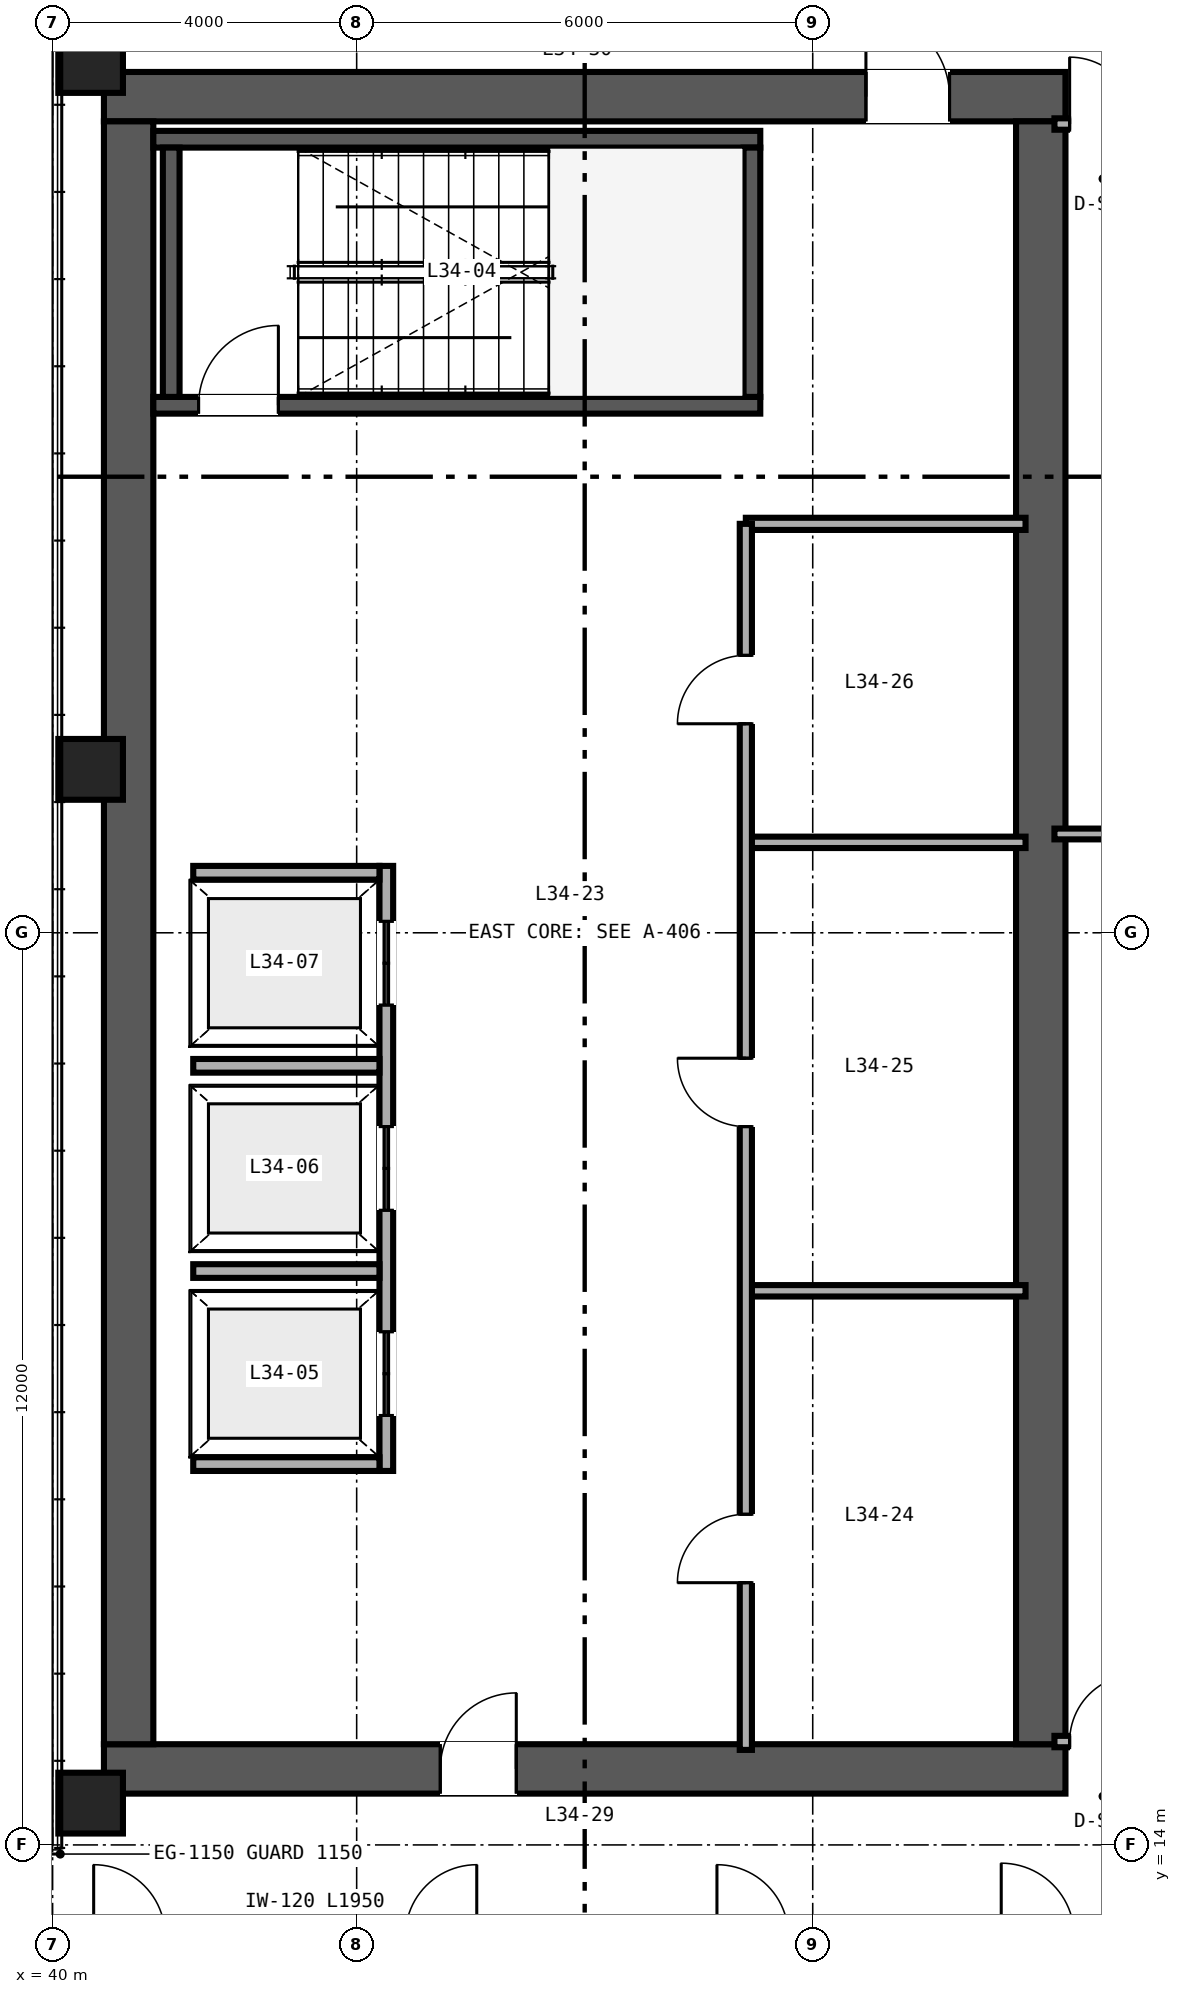
"""IFC4 building model, lengths in metres.
Left out: names, types, materials, properties, quantities, classifications, styles, units other than length and angle.
Written with IfcOpenShell. Run it as: python <this file> out.ifc"""

import sys

from ifc_helpers import new_model, si_unit, direction, frame, frame_2d, origin, origin_2d, place, context, subcontext, project, spatial, rectangle, hollow_rectangle, extrude, source, transform, mapped, element, fill, save


model = new_model("IFC4")
c1 = context("Model", 3, precision=1e-05, world=origin(), true_north=direction((0.0, 1.0)))
c2 = subcontext(c1, "Body", "Model", "MODEL_VIEW")
j1 = project(units=[si_unit("LENGTHUNIT", "METRE"), si_unit("PLANEANGLEUNIT", "RADIAN")], contexts=[c1])
p1 = place(None, origin())
s1 = spatial("IfcSite", under=j1, at=p1, CompositionType="ELEMENT")
p2 = place(p1, origin())
s2 = spatial("IfcBuilding", under=s1, at=p2, CompositionType="ELEMENT")
p3 = place(p2, frame((0.0, 0.0, 136.8)))
s3 = spatial("IfcBuildingStorey", under=s2, at=p3, CompositionType="ELEMENT", Elevation=136.8)
p4 = place(p3, frame((40.675, 15.0, 0.0), z_axis=(0.0, 0.0, 1.0), x_axis=(1.0, 0.0, 0.0)))
e1 = element("IfcWall", 1, at=p4, inside=s3, PredefinedType="SHEAR", context=c2, shape_type="SweptSolid", body=[
    extrude(rectangle(XDim=12.65, YDim=0.65, at=frame_2d((6.325, 0.0))), origin(), (0.0, 0.0, 1.0), 3.36),
])
p5 = place(p4, frame((4.425, 0.0, 0.0)))
e2 = element("IfcOpeningElement", 2, at=p5, cuts=e1, PredefinedType="OPENING", context=c2, shape_type="SweptSolid", body=[
    extrude(rectangle(XDim=1.0, YDim=2.15, at=frame_2d((0.5, 1.075))), frame((0.0, 0.335, 0.0), z_axis=(0.0, -1.0, 0.0), x_axis=(1.0, 0.0, 0.0)), (0.0, 0.0, 1.0), 0.67),
])
p6 = place(p3, frame((40.675, 37.0, 0.0), z_axis=(0.0, 0.0, 1.0), x_axis=(1.0, 0.0, 0.0)))
e3 = element("IfcWall", 3, at=p6, inside=s3, PredefinedType="SHEAR", context=c2, shape_type="SweptSolid", body=[
    extrude(rectangle(XDim=12.65, YDim=0.65, at=frame_2d((6.325, 0.0))), origin(), (0.0, 0.0, 1.0), 3.36),
])
p7 = place(p6, frame((10.025, 0.0, 0.0)))
e4 = element("IfcOpeningElement", 4, at=p7, cuts=e3, PredefinedType="OPENING", context=c2, shape_type="SweptSolid", body=[
    extrude(rectangle(XDim=1.1, YDim=2.15, at=frame_2d((0.55, 1.075))), frame((0.0, 0.335, 0.0), z_axis=(0.0, -1.0, 0.0), x_axis=(1.0, 0.0, 0.0)), (0.0, 0.0, 1.0), 0.67),
])
for number, where, z_axis, x_axis in (
    (5, (41.0, 15.325, 0.0), (0.0, 0.0, 1.0), (0.0, 1.0, 0.0)),
    (6, (53.0, 15.325, 0.0), (0.0, 0.0, 1.0), (0.0, 1.0, 0.0)),
):
    element("IfcWall", number, at=place(p3, frame(where, z_axis=z_axis, x_axis=x_axis)), inside=s3, PredefinedType="SHEAR", context=c2, shape_type="SweptSolid", body=[
        extrude(rectangle(XDim=21.35, YDim=0.65, at=frame_2d((10.675, 0.0))), origin(), (0.0, 0.0, 1.0), 3.36),
    ])
p8 = place(p3, frame((41.325, 32.94, 0.0), z_axis=(0.0, 0.0, 1.0), x_axis=(1.0, 0.0, 0.0)))
e7 = element("IfcWall", 7, at=p8, inside=s3, PredefinedType="SHEAR", context=c2, shape_type="SweptSolid", body=[
    extrude(rectangle(XDim=7.985, YDim=0.22, at=frame_2d((3.993, 0.0))), origin(), (0.0, 0.0, 1.0), 3.4),
])
p9 = place(p8, frame((0.595, 0.0, 0.0)))
e8 = element("IfcOpeningElement", 8, at=p9, cuts=e7, PredefinedType="OPENING", context=c2, shape_type="SweptSolid", body=[
    extrude(rectangle(XDim=1.05, YDim=2.15, at=frame_2d((0.525, 1.075))), frame((0.0, 0.12, 0.0), z_axis=(0.0, -1.0, 0.0), x_axis=(1.0, 0.0, 0.0)), (0.0, 0.0, 1.0), 0.24),
])
p10 = place(p3, frame((41.325, 36.44, 0.0), z_axis=(0.0, 0.0, 1.0), x_axis=(1.0, 0.0, 0.0)))
e9 = element("IfcWall", 9, at=p10, inside=s3, PredefinedType="SHEAR", context=c2, shape_type="SweptSolid", body=[
    extrude(rectangle(XDim=7.985, YDim=0.22, at=frame_2d((3.993, 0.0))), origin(), (0.0, 0.0, 1.0), 3.4),
])
for number, where, z_axis, x_axis in (
    (10, (41.56, 33.05, 0.0), (0.0, 0.0, 1.0), (0.0, 1.0, 0.0)),
    (11, (49.2, 33.05, 0.0), (0.0, 0.0, 1.0), (0.0, 1.0, 0.0)),
):
    element("IfcWall", number, at=place(p3, frame(where, z_axis=z_axis, x_axis=x_axis)), inside=s3, PredefinedType="SHEAR", context=c2, shape_type="SweptSolid", body=[
        extrude(rectangle(XDim=3.28, YDim=0.22, at=frame_2d((1.64, 0.0))), origin(), (0.0, 0.0, 1.0), 3.4),
    ])
m1 = source(origin(), c2, "Body", "SweptSolid", [
    extrude(hollow_rectangle(XDim=0.85, YDim=0.8, WallThickness=0.032, at=origin_2d()), origin(), (0.0, 0.0, 1.0), 3.36),
])
for number, where, z_axis, x_axis in (
    (12, (40.5, 14.55, 0.0), (0.0, 0.0, 1.0), (1.0, 0.0, 0.0)),
    (13, (40.5, 28.15, 0.0), (0.0, 0.0, 1.0), (1.0, 0.0, 0.0)),
    (14, (40.5, 37.45, 0.0), (0.0, 0.0, 1.0), (1.0, 0.0, 0.0)),
):
    element("IfcColumn", number, at=place(p3, frame(where, z_axis=z_axis, x_axis=x_axis)), inside=s3, PredefinedType="COLUMN", context=c2, shape_type="MappedRepresentation", body=[
        mapped(m1, transform((0.0, 0.0, 0.0), scale=1.0)),
    ])
p11 = place(p3, frame((44.39, 18.92, 0.0), z_axis=(0.0, 0.0, 1.0), x_axis=(0.0, 1.0, 0.0)))
e15 = element("IfcWall", 15, at=p11, inside=s3, PredefinedType="SOLIDWALL", context=c2, shape_type="SweptSolid", body=[
    extrude(rectangle(XDim=7.96, YDim=0.18, at=frame_2d((3.98, 0.0))), origin(), (0.0, 0.0, 1.0), 3.36),
])
p12 = place(p11, frame((0.73, 0.0, 0.0)))
e16 = element("IfcOpeningElement", 16, at=p12, cuts=e15, PredefinedType="OPENING", context=c2, shape_type="SweptSolid", body=[
    extrude(rectangle(XDim=1.1, YDim=2.2, at=frame_2d((0.55, 1.1))), frame((0.0, 0.1, 0.0), z_axis=(0.0, -1.0, 0.0), x_axis=(1.0, 0.0, 0.0)), (0.0, 0.0, 1.0), 0.2),
])
p13 = place(p11, frame((3.43, 0.0, 0.0)))
e17 = element("IfcOpeningElement", 17, at=p13, cuts=e15, PredefinedType="OPENING", context=c2, shape_type="SweptSolid", body=[
    extrude(rectangle(XDim=1.1, YDim=2.2, at=frame_2d((0.55, 1.1))), frame((0.0, 0.1, 0.0), z_axis=(0.0, -1.0, 0.0), x_axis=(1.0, 0.0, 0.0)), (0.0, 0.0, 1.0), 0.2),
])
p14 = place(p11, frame((6.13, 0.0, 0.0)))
e18 = element("IfcOpeningElement", 18, at=p14, cuts=e15, PredefinedType="OPENING", context=c2, shape_type="SweptSolid", body=[
    extrude(rectangle(XDim=1.1, YDim=2.2, at=frame_2d((0.55, 1.1))), frame((0.0, 0.1, 0.0), z_axis=(0.0, -1.0, 0.0), x_axis=(1.0, 0.0, 0.0)), (0.0, 0.0, 1.0), 0.2),
])
for number, where, z_axis, x_axis in (
    (19, (41.85, 19.01, 0.0), (0.0, 0.0, 1.0), (1.0, 0.0, 0.0)),
    (20, (41.85, 26.79, 0.0), (0.0, 0.0, 1.0), (1.0, 0.0, 0.0)),
    (21, (41.85, 21.55, 0.0), (0.0, 0.0, 1.0), (1.0, 0.0, 0.0)),
    (22, (41.85, 24.25, 0.0), (0.0, 0.0, 1.0), (1.0, 0.0, 0.0)),
):
    element("IfcWall", number, at=place(p3, frame(where, z_axis=z_axis, x_axis=x_axis)), inside=s3, PredefinedType="SOLIDWALL", context=c2, shape_type="SweptSolid", body=[
        extrude(rectangle(XDim=2.45, YDim=0.18, at=frame_2d((1.225, 0.0))), origin(), (0.0, 0.0, 1.0), 3.36),
    ])
p15 = place(p3, frame((49.12, 31.38, 0.0), z_axis=(0.0, 0.0, 1.0), x_axis=(1.0, 0.0, 0.0)))
e23 = element("IfcWall", 23, at=p15, inside=s3, PredefinedType="PARTITIONING", context=c2, shape_type="SweptSolid", body=[
    extrude(rectangle(XDim=3.68, YDim=0.16, at=frame_2d((1.84, 0.0))), origin(), (0.0, 0.0, 1.0), 2.36),
])
for number, where, z_axis, x_axis in (
    (24, (49.12, 21.29, 0.0), (0.0, 0.0, 1.0), (1.0, 0.0, 0.0)),
    (25, (49.12, 27.19, 0.0), (0.0, 0.0, 1.0), (1.0, 0.0, 0.0)),
):
    element("IfcWall", number, at=place(p3, frame(where, z_axis=z_axis, x_axis=x_axis)), inside=s3, PredefinedType="PARTITIONING", context=c2, shape_type="SweptSolid", body=[
        extrude(rectangle(XDim=3.68, YDim=0.15, at=frame_2d((1.84, 0.0))), origin(), (0.0, 0.0, 1.0), 3.36),
    ])
p16 = place(p3, frame((49.12, 15.25, 0.0), z_axis=(0.0, 0.0, 1.0), x_axis=(0.0, 1.0, 0.0)))
e26 = element("IfcWall", 26, at=p16, inside=s3, PredefinedType="PARTITIONING", context=c2, shape_type="SweptSolid", body=[
    extrude(rectangle(XDim=16.13, YDim=0.16, at=frame_2d((8.065, 0.0))), origin(), (0.0, 0.0, 1.0), 2.36),
])
p17 = place(p16, frame((2.2, 0.0, 0.0)))
e27 = element("IfcOpeningElement", 27, at=p17, cuts=e26, PredefinedType="OPENING", context=c2, shape_type="SweptSolid", body=[
    extrude(rectangle(XDim=0.9, YDim=2.15, at=frame_2d((0.45, 1.075))), frame((0.0, 0.09, 0.0), z_axis=(0.0, -1.0, 0.0), x_axis=(1.0, 0.0, 0.0)), (0.0, 0.0, 1.0), 0.18),
])
p18 = place(p16, frame((8.2, 0.0, 0.0)))
e28 = element("IfcOpeningElement", 28, at=p18, cuts=e26, PredefinedType="OPENING", context=c2, shape_type="SweptSolid", body=[
    extrude(rectangle(XDim=0.9, YDim=2.15, at=frame_2d((0.45, 1.075))), frame((0.0, 0.09, 0.0), z_axis=(0.0, -1.0, 0.0), x_axis=(1.0, 0.0, 0.0)), (0.0, 0.0, 1.0), 0.18),
])
p19 = place(p16, frame((13.5, 0.0, 0.0)))
e29 = element("IfcOpeningElement", 29, at=p19, cuts=e26, PredefinedType="OPENING", context=c2, shape_type="SweptSolid", body=[
    extrude(rectangle(XDim=0.9, YDim=2.15, at=frame_2d((0.45, 1.075))), frame((0.0, 0.09, 0.0), z_axis=(0.0, -1.0, 0.0), x_axis=(1.0, 0.0, 0.0)), (0.0, 0.0, 1.0), 0.18),
])
p20 = place(p3, frame((53.18, 15.36, 0.0), z_axis=(0.0, 0.0, 1.0), x_axis=(1.0, 0.0, 0.0)))
e30 = element("IfcWall", 30, at=p20, inside=s3, PredefinedType="PARTITIONING", context=c2, shape_type="SweptSolid", body=[
    extrude(rectangle(XDim=2.66, YDim=0.15, at=frame_2d((1.33, 0.0))), origin(), (0.0, 0.0, 1.0), 2.581),
])
p21 = place(p20, frame((0.2, 0.0, 0.0)))
e31 = element("IfcOpeningElement", 31, at=p21, cuts=e30, PredefinedType="OPENING", context=c2, shape_type="SweptSolid", body=[
    extrude(rectangle(XDim=0.88, YDim=2.15, at=frame_2d((0.44, 1.075))), frame((0.0, 0.085, 0.0), z_axis=(0.0, -1.0, 0.0), x_axis=(1.0, 0.0, 0.0)), (0.0, 0.0, 1.0), 0.17),
])
p22 = place(p3, frame((53.18, 36.64, 0.0), z_axis=(0.0, 0.0, 1.0), x_axis=(1.0, 0.0, 0.0)))
e32 = element("IfcWall", 32, at=p22, inside=s3, PredefinedType="PARTITIONING", context=c2, shape_type="SweptSolid", body=[
    extrude(rectangle(XDim=2.66, YDim=0.15, at=frame_2d((1.33, 0.0))), origin(), (0.0, 0.0, 1.0), 2.743),
])
p23 = place(p22, frame((0.2, 0.0, 0.0)))
e33 = element("IfcOpeningElement", 33, at=p23, cuts=e32, PredefinedType="OPENING", context=c2, shape_type="SweptSolid", body=[
    extrude(rectangle(XDim=0.88, YDim=2.15, at=frame_2d((0.44, 1.075))), frame((0.0, 0.085, 0.0), z_axis=(0.0, -1.0, 0.0), x_axis=(1.0, 0.0, 0.0)), (0.0, 0.0, 1.0), 0.17),
])
p24 = place(p3, frame((53.18, 27.3, 0.0), z_axis=(0.0, 0.0, 1.0), x_axis=(1.0, 0.0, 0.0)))
e34 = element("IfcWall", 34, at=p24, inside=s3, PredefinedType="PARTITIONING", context=c2, shape_type="SweptSolid", body=[
    extrude(rectangle(XDim=2.66, YDim=0.142, at=frame_2d((1.33, 0.0))), origin(), (0.0, 0.0, 1.0), 2.581),
])
m2 = source(origin(), c2, "Body", "SweptSolid", [
    extrude(rectangle(XDim=1.05, YDim=2.15, at=frame_2d((0.525, 1.075))), frame((0.0, 0.025, 0.0), z_axis=(0.0, -1.0, 0.0), x_axis=(1.0, 0.0, 0.0)), (0.0, 0.0, 1.0), 0.05),
])
p25 = place(p9, origin())
e35 = element("IfcDoor", 35, at=p25, inside=s3, OperationType="SINGLE_SWING_RIGHT", PredefinedType="DOOR", context=c2, shape_type="MappedRepresentation", body=[
    mapped(m2, transform((0.0, 0.0, 0.0), scale=1.0)),
])
fill(e8, e35)
m3 = source(origin(), c2, "Body", "SweptSolid", [
    extrude(rectangle(XDim=1.1, YDim=2.2, at=frame_2d((0.55, 1.1))), frame((0.0, 0.025, 0.0), z_axis=(0.0, -1.0, 0.0), x_axis=(1.0, 0.0, 0.0)), (0.0, 0.0, 1.0), 0.05),
])
p26 = place(p12, origin())
e36 = element("IfcDoor", 36, at=p26, inside=s3, OperationType="DOUBLE_DOOR_SLIDING", PredefinedType="DOOR", context=c2, shape_type="MappedRepresentation", body=[
    mapped(m3, transform((0.0, 0.0, 0.0), scale=1.0)),
])
fill(e16, e36)
p27 = place(p13, origin())
e37 = element("IfcDoor", 37, at=p27, inside=s3, OperationType="DOUBLE_DOOR_SLIDING", PredefinedType="DOOR", context=c2, shape_type="MappedRepresentation", body=[
    mapped(m3, transform((0.0, 0.0, 0.0), scale=1.0)),
])
fill(e17, e37)
p28 = place(p14, origin())
e38 = element("IfcDoor", 38, at=p28, inside=s3, OperationType="DOUBLE_DOOR_SLIDING", PredefinedType="DOOR", context=c2, shape_type="MappedRepresentation", body=[
    mapped(m3, transform((0.0, 0.0, 0.0), scale=1.0)),
])
fill(e18, e38)
m4 = source(origin(), c2, "Body", "SweptSolid", [
    extrude(rectangle(XDim=1.0, YDim=2.15, at=frame_2d((0.5, 1.075))), frame((0.0, 0.025, 0.0), z_axis=(0.0, -1.0, 0.0), x_axis=(1.0, 0.0, 0.0)), (0.0, 0.0, 1.0), 0.05),
])
p29 = place(p5, origin())
e39 = element("IfcDoor", 39, at=p29, inside=s3, OperationType="SINGLE_SWING_RIGHT", PredefinedType="DOOR", context=c2, shape_type="MappedRepresentation", body=[
    mapped(m4, transform((0.0, 0.0, 0.0), scale=1.0)),
])
fill(e2, e39)
m5 = source(origin(), c2, "Body", "SweptSolid", [
    extrude(rectangle(XDim=1.1, YDim=2.15, at=frame_2d((0.55, 1.075))), frame((0.0, 0.025, 0.0), z_axis=(0.0, -1.0, 0.0), x_axis=(1.0, 0.0, 0.0)), (0.0, 0.0, 1.0), 0.05),
])
p30 = place(p7, origin())
e40 = element("IfcDoor", 40, at=p30, inside=s3, OperationType="SINGLE_SWING_LEFT", PredefinedType="DOOR", context=c2, shape_type="MappedRepresentation", body=[
    mapped(m5, transform((0.0, 0.0, 0.0), scale=1.0)),
])
fill(e4, e40)
m6 = source(origin(), c2, "Body", "SweptSolid", [
    extrude(rectangle(XDim=0.9, YDim=2.15, at=frame_2d((0.45, 1.075))), frame((0.0, 0.025, 0.0), z_axis=(0.0, -1.0, 0.0), x_axis=(1.0, 0.0, 0.0)), (0.0, 0.0, 1.0), 0.05),
])
p31 = place(p17, origin())
e41 = element("IfcDoor", 41, at=p31, inside=s3, OperationType="SINGLE_SWING_LEFT", PredefinedType="DOOR", context=c2, shape_type="MappedRepresentation", body=[
    mapped(m6, transform((0.0, 0.0, 0.0), scale=1.0)),
])
fill(e27, e41)
p32 = place(p18, origin())
e42 = element("IfcDoor", 42, at=p32, inside=s3, OperationType="SINGLE_SWING_RIGHT", PredefinedType="DOOR", context=c2, shape_type="MappedRepresentation", body=[
    mapped(m6, transform((0.0, 0.0, 0.0), scale=1.0)),
])
fill(e28, e42)
p33 = place(p19, origin())
e43 = element("IfcDoor", 43, at=p33, inside=s3, OperationType="SINGLE_SWING_LEFT", PredefinedType="DOOR", context=c2, shape_type="MappedRepresentation", body=[
    mapped(m6, transform((0.0, 0.0, 0.0), scale=1.0)),
])
fill(e29, e43)
m7 = source(origin(), c2, "Body", "SweptSolid", [
    extrude(rectangle(XDim=0.88, YDim=2.15, at=frame_2d((0.44, 1.075))), frame((0.0, 0.025, 0.0), z_axis=(0.0, -1.0, 0.0), x_axis=(1.0, 0.0, 0.0)), (0.0, 0.0, 1.0), 0.05),
])
p34 = place(p21, origin())
e44 = element("IfcDoor", 44, at=p34, inside=s3, OperationType="SINGLE_SWING_RIGHT", PredefinedType="DOOR", context=c2, shape_type="MappedRepresentation", body=[
    mapped(m7, transform((0.0, 0.0, 0.0), scale=1.0)),
])
fill(e31, e44)
p35 = place(p23, origin())
e45 = element("IfcDoor", 45, at=p35, inside=s3, OperationType="SINGLE_SWING_LEFT", PredefinedType="DOOR", context=c2, shape_type="MappedRepresentation", body=[
    mapped(m7, transform((0.0, 0.0, 0.0), scale=1.0)),
])
fill(e33, e45)
save(model, sys.argv[1])
